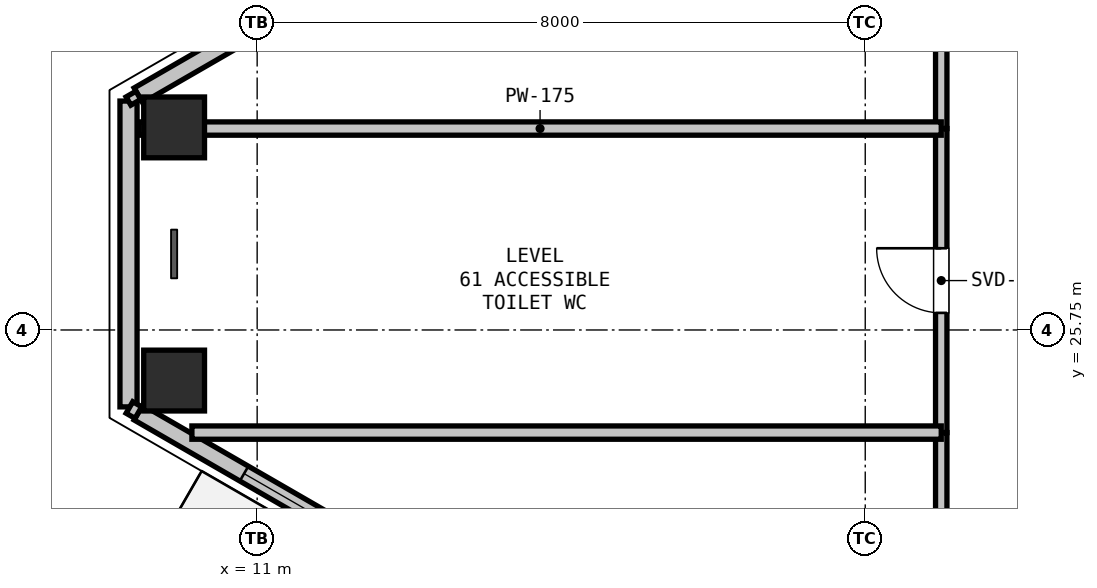
"""IFC4 building model, lengths in metres.
Left out: names, types, materials, properties, quantities, classifications, styles, units other than length and angle.
Written with IfcOpenShell. Run it as: python <this file> out.ifc"""

import sys

from ifc_helpers import new_model, si_unit, direction, frame, frame_2d, origin, origin_2d, place, context, subcontext, project, spatial, rectangle, hollow_rectangle, extrude, element, fill, save


model = new_model("IFC4")
c1 = context("Model", 3, precision=1e-05, world=origin(), true_north=direction((0.0, 1.0)))
c2 = subcontext(c1, "Body", "Model", "MODEL_VIEW")
j1 = project(units=[si_unit("LENGTHUNIT", "METRE"), si_unit("PLANEANGLEUNIT", "RADIAN")], contexts=[c1])
p1 = place(None, origin())
s1 = spatial("IfcSite", under=j1, at=p1, CompositionType="ELEMENT")
p2 = place(p1, origin())
s2 = spatial("IfcBuilding", under=s1, at=p2, CompositionType="ELEMENT")
p3 = place(p2, frame((0.0, 0.0, 218.4)))
s3 = spatial("IfcBuildingStorey", under=s2, at=p3, CompositionType="ELEMENT", Elevation=218.4)
for number, where, z_axis, x_axis in (
    (1, (9.907, 28.415, 0.0), (0.0, 0.0, 1.0), (1.0, 0.0, 0.0)),
    (2, (9.907, 25.085, 0.0), (0.0, 0.0, 1.0), (1.0, 0.0, 0.0)),
):
    element("IfcColumn", number, at=place(p3, frame(where, z_axis=z_axis, x_axis=x_axis)), inside=s3, PredefinedType="COLUMN", context=c2, shape_type="SweptSolid", body=[
        extrude(hollow_rectangle(XDim=0.8, YDim=0.8, WallThickness=0.025, at=origin_2d()), origin(), (0.0, 0.0, 1.0), 3.23),
    ])
p4 = place(p3, frame((9.308, 24.738, 0.0), z_axis=(0.0, 0.0, 1.0), x_axis=(0.0, 1.0, 0.0)))
e3 = element("IfcWall", 3, at=p4, inside=s3, PredefinedType="SOLIDWALL", context=c2, shape_type="SweptSolid", body=[
    extrude(rectangle(XDim=4.023, YDim=0.225, at=frame_2d((2.012, 0.0))), origin(), (0.0, 0.0, 1.0), 4.2),
])
p5 = place(p3, frame((9.438, 28.837, 0.0), z_axis=(0.0, 0.0, 1.0), x_axis=(0.866027133173, 0.499997004599, 0.0)))
e4 = element("IfcWall", 4, at=p5, inside=s3, PredefinedType="SOLIDWALL", context=c2, shape_type="SweptSolid", body=[
    extrude(rectangle(XDim=9.699, YDim=0.225, at=frame_2d((4.849, 0.0))), origin(), (0.0, 0.0, 1.0), 4.2),
])
p6 = place(p5, frame((7.352, 0.0, 0.0)))
e5 = element("IfcOpeningElement", 5, at=p6, cuts=e4, PredefinedType="OPENING", context=c2, shape_type="SweptSolid", body=[
    extrude(rectangle(XDim=1.0, YDim=2.1, at=frame_2d((0.5, 1.05))), frame((0.0, 0.123, 0.0), z_axis=(0.0, -1.0, 0.0), x_axis=(1.0, 0.0, 0.0)), (0.0, 0.0, 1.0), 0.245),
])
p7 = place(p3, frame((17.837, 19.814, 0.0), z_axis=(0.0, 0.0, 1.0), x_axis=(-0.866027133173, 0.499997004599, 0.0)))
e6 = element("IfcWall", 6, at=p7, inside=s3, PredefinedType="SOLIDWALL", context=c2, shape_type="SweptSolid", body=[
    extrude(rectangle(XDim=9.699, YDim=0.225, at=frame_2d((4.849, 0.0))), origin(), (0.0, 0.0, 1.0), 3.215),
])
p8 = place(p7, frame((5.693, 0.0, 0.9)))
e7 = element("IfcOpeningElement", 7, at=p8, cuts=e6, PredefinedType="OPENING", context=c2, shape_type="SweptSolid", body=[
    extrude(rectangle(XDim=2.4, YDim=2.2, at=frame_2d((1.2, 1.1))), frame((0.0, 0.123, 0.0), z_axis=(0.0, -1.0, 0.0), x_axis=(1.0, 0.0, 0.0)), (0.0, 0.0, 1.0), 0.245),
])
p9 = place(p3, frame((20.0, 18.614, 0.0), z_axis=(0.0, 0.0, 1.0), x_axis=(0.0, 1.0, 0.0)))
e8 = element("IfcWall", 8, at=p9, inside=s3, PredefinedType="PARTITIONING", context=c2, shape_type="SweptSolid", body=[
    extrude(rectangle(XDim=5.786, YDim=0.15, at=frame_2d((2.893, 0.0))), origin(), (0.0, 0.0, 1.0), 2.365),
])
p10 = place(p9, frame((2.468, 0.0, 0.0)))
e9 = element("IfcOpeningElement", 9, at=p10, cuts=e8, PredefinedType="OPENING", context=c2, shape_type="SweptSolid", body=[
    extrude(rectangle(XDim=0.85, YDim=2.1, at=frame_2d((0.425, 1.05))), frame((0.0, 0.085, 0.0), z_axis=(0.0, -1.0, 0.0), x_axis=(1.0, 0.0, 0.0)), (0.0, 0.0, 1.0), 0.17),
])
p11 = place(p3, frame((20.0, 24.4, 0.0), z_axis=(0.0, 0.0, 1.0), x_axis=(0.0, 1.0, 0.0)))
e10 = element("IfcWall", 10, at=p11, inside=s3, PredefinedType="PARTITIONING", context=c2, shape_type="SweptSolid", body=[
    extrude(rectangle(XDim=4.0, YDim=0.15, at=frame_2d((2.0, 0.0))), origin(), (0.0, 0.0, 1.0), 3.215),
])
p12 = place(p11, frame((1.575, 0.0, 0.0)))
e11 = element("IfcOpeningElement", 11, at=p12, cuts=e10, PredefinedType="OPENING", context=c2, shape_type="SweptSolid", body=[
    extrude(rectangle(XDim=0.85, YDim=2.1, at=frame_2d((0.425, 1.05))), frame((0.0, 0.085, 0.0), z_axis=(0.0, -1.0, 0.0), x_axis=(1.0, 0.0, 0.0)), (0.0, 0.0, 1.0), 0.17),
])
p13 = place(p3, frame((20.0, 28.4, 0.0), z_axis=(0.0, 0.0, 1.0), x_axis=(0.0, 1.0, 0.0)))
e12 = element("IfcWall", 12, at=p13, inside=s3, PredefinedType="PARTITIONING", context=c2, shape_type="SweptSolid", body=[
    extrude(rectangle(XDim=6.487, YDim=0.15, at=frame_2d((3.243, 0.0))), origin(), (0.0, 0.0, 1.0), 2.365),
])
p14 = place(p13, frame((2.743, 0.0, 0.0)))
e13 = element("IfcOpeningElement", 13, at=p14, cuts=e12, PredefinedType="OPENING", context=c2, shape_type="SweptSolid", body=[
    extrude(rectangle(XDim=1.0, YDim=2.15, at=frame_2d((0.5, 1.075))), frame((0.0, 0.085, 0.0), z_axis=(0.0, -1.0, 0.0), x_axis=(1.0, 0.0, 0.0)), (0.0, 0.0, 1.0), 0.17),
])
p15 = place(p3, frame((10.142, 24.4, 0.0), z_axis=(0.0, 0.0, 1.0), x_axis=(1.0, 0.0, 0.0)))
e14 = element("IfcWall", 14, at=p15, inside=s3, PredefinedType="PLUMBINGWALL", context=c2, shape_type="SweptSolid", body=[
    extrude(rectangle(XDim=9.858, YDim=0.175, at=frame_2d((4.929, 0.0))), origin(), (0.0, 0.0, 1.0), 3.215),
])
p16 = place(p3, frame((9.437, 24.663, 0.0), z_axis=(0.0, 0.0, 1.0), x_axis=(-0.866125498941, 0.499826590014, 0.0)))
e15 = element("IfcWall", 15, at=p16, inside=s3, PredefinedType="PLUMBINGWALL", context=c2, shape_type="SweptSolid", body=[
    extrude(rectangle(XDim=0.135, YDim=0.175, at=frame_2d((0.068, 0.0))), origin(), (0.0, 0.0, 1.0), 4.58),
])
p17 = place(p3, frame((9.444, 28.4, 0.0), z_axis=(0.0, 0.0, 1.0), x_axis=(1.0, 0.0, 0.0)))
e16 = element("IfcWall", 16, at=p17, inside=s3, PredefinedType="PLUMBINGWALL", context=c2, shape_type="SweptSolid", body=[
    extrude(rectangle(XDim=10.556, YDim=0.175, at=frame_2d((5.278, 0.0))), origin(), (0.0, 0.0, 1.0), 3.215),
])
p18 = place(p3, frame((9.307, 28.762, 0.0), z_axis=(0.0, 0.0, 1.0), x_axis=(0.865833797362, 0.500331725305, 0.0)))
e17 = element("IfcWall", 17, at=p18, inside=s3, PredefinedType="PARTITIONING", context=c2, shape_type="SweptSolid", body=[
    extrude(rectangle(XDim=0.15, YDim=0.125, at=frame_2d((0.075, 0.0))), origin(), (0.0, 0.0, 1.0), 4.58),
])
p19 = place(p8, origin())
e18 = element("IfcWindow", 18, at=p19, inside=s3, PartitioningType="SINGLE_PANEL", PredefinedType="WINDOW", context=c2, shape_type="SweptSolid", body=[
    extrude(rectangle(XDim=2.4, YDim=2.2, at=frame_2d((1.2, 1.1))), frame((0.0, 0.03, 0.0), z_axis=(0.0, -1.0, 0.0), x_axis=(1.0, 0.0, 0.0)), (0.0, 0.0, 1.0), 0.06),
])
fill(e7, e18)
p20 = place(p12, origin())
e19 = element("IfcDoor", 19, at=p20, inside=s3, OperationType="SINGLE_SWING_RIGHT", PredefinedType="DOOR", context=c2, shape_type="SweptSolid", body=[
    extrude(rectangle(XDim=0.85, YDim=2.1, at=frame_2d((0.425, 1.05))), frame((0.0, 0.025, 0.0), z_axis=(0.0, -1.0, 0.0), x_axis=(1.0, 0.0, 0.0)), (0.0, 0.0, 1.0), 0.05),
])
fill(e11, e19)
save(model, sys.argv[1])
